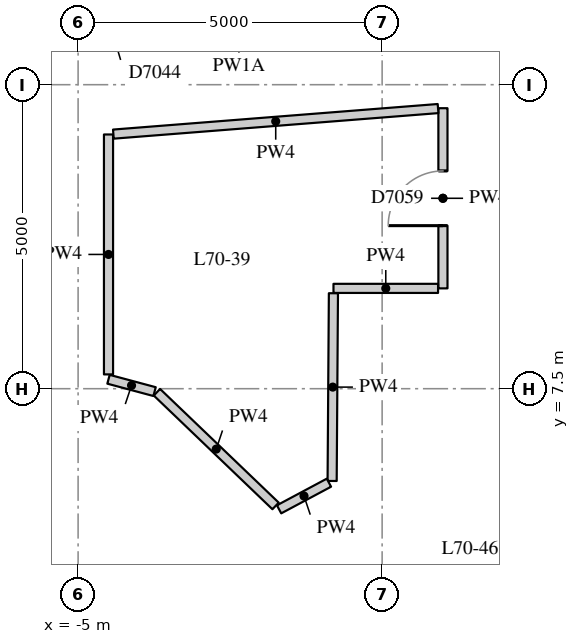
"""IFC4 building model, lengths in metres.
Left out: names, types, materials, properties, quantities, classifications, styles, units other than length and angle.
Written with IfcOpenShell. Run it as: python <this file> out.ifc"""

import sys

from ifc_helpers import new_model, si_unit, direction, frame, frame_2d, origin, place, context, subcontext, project, spatial, rectangle, extrude, element, fill, save


model = new_model("IFC4")
c1 = context("Model", 3, precision=1e-05, world=origin(), true_north=direction((0.0, 1.0)))
c2 = subcontext(c1, "Body", "Model", "MODEL_VIEW")
j1 = project(units=[si_unit("LENGTHUNIT", "METRE"), si_unit("PLANEANGLEUNIT", "RADIAN")], contexts=[c1])
p1 = place(None, origin())
s1 = spatial("IfcSite", under=j1, at=p1, CompositionType="ELEMENT")
p2 = place(p1, origin())
s2 = spatial("IfcBuilding", under=s1, at=p2, CompositionType="ELEMENT")
p3 = place(p2, frame((0.0, 0.0, 246.5)))
s3 = spatial("IfcBuildingStorey", under=s2, at=p3, CompositionType="ELEMENT", Elevation=246.5)
p4 = place(p3, frame((1.0, 12.113, 0.0), z_axis=(0.0, 0.0, 1.0), x_axis=(0.0, -1.0, 0.0)))
e1 = element("IfcWall", 1, at=p4, inside=s3, PredefinedType="PARTITIONING", context=c2, shape_type="SweptSolid", body=[
    extrude(rectangle(XDim=2.963, YDim=0.15, at=frame_2d((1.482, 0.0))), origin(), (0.0, 0.0, 1.0), 3.02),
])
p5 = place(p4, frame((1.032, 0.0, 0.0)))
e2 = element("IfcOpeningElement", 2, at=p5, cuts=e1, PredefinedType="OPENING", context=c2, shape_type="SweptSolid", body=[
    extrude(rectangle(XDim=0.9, YDim=2.1, at=frame_2d((0.45, 1.05))), frame((0.0, 0.085, 0.0), z_axis=(0.0, -1.0, 0.0), x_axis=(1.0, 0.0, 0.0)), (0.0, 0.0, 1.0), 0.17),
])
p6 = place(p3, frame((0.92, 9.15, 0.0), z_axis=(0.0, 0.0, 1.0), x_axis=(-1.0, 0.0, 0.0)))
e3 = element("IfcWall", 3, at=p6, inside=s3, PredefinedType="PARTITIONING", context=c2, shape_type="SweptSolid", body=[
    extrude(rectangle(XDim=1.72, YDim=0.15, at=frame_2d((0.86, 0.0))), origin(), (0.0, 0.0, 1.0), 3.02),
])
p7 = place(p3, frame((-0.801, 9.07, 0.0), z_axis=(0.0, 0.0, 1.0), x_axis=(-0.006879482938, -0.999976336077, 0.0)))
e4 = element("IfcWall", 4, at=p7, inside=s3, PredefinedType="PARTITIONING", context=c2, shape_type="SweptSolid", body=[
    extrude(rectangle(XDim=3.087, YDim=0.15, at=frame_2d((1.544, 0.0))), origin(), (0.0, 0.0, 1.0), 3.02),
])
p8 = place(p3, frame((-0.875, 5.954, 0.0), z_axis=(0.0, 0.0, 1.0), x_axis=(-0.882018256262, -0.471215232798, 0.0)))
e5 = element("IfcWall", 5, at=p8, inside=s3, PredefinedType="PARTITIONING", context=c2, shape_type="SweptSolid", body=[
    extrude(rectangle(XDim=0.929, YDim=0.15, at=frame_2d((0.465, 0.0))), origin(), (0.0, 0.0, 1.0), 3.02),
])
p9 = place(p3, frame((-1.752, 5.572, 0.0), z_axis=(0.0, 0.0, 1.0), x_axis=(-0.721943077846, 0.691952449487, 0.0)))
e6 = element("IfcWall", 6, at=p9, inside=s3, PredefinedType="PARTITIONING", context=c2, shape_type="SweptSolid", body=[
    extrude(rectangle(XDim=2.703, YDim=0.15, at=frame_2d((1.351, 0.0))), origin(), (0.0, 0.0, 1.0), 3.02),
])
p10 = place(p3, frame((-3.742, 7.452, 0.0), z_axis=(0.0, 0.0, 1.0), x_axis=(-0.965903596155, 0.258901994846, 0.0)))
e7 = element("IfcWall", 7, at=p10, inside=s3, PredefinedType="PARTITIONING", context=c2, shape_type="SweptSolid", body=[
    extrude(rectangle(XDim=0.785, YDim=0.15, at=frame_2d((0.392, 0.0))), origin(), (0.0, 0.0, 1.0), 3.02),
])
p11 = place(p3, frame((-4.5, 7.735, 0.0), z_axis=(0.0, 0.0, 1.0), x_axis=(0.0, 1.0, 0.0)))
e8 = element("IfcWall", 8, at=p11, inside=s3, PredefinedType="PARTITIONING", context=c2, shape_type="SweptSolid", body=[
    extrude(rectangle(XDim=3.946, YDim=0.15, at=frame_2d((1.973, 0.0))), origin(), (0.0, 0.0, 1.0), 3.02),
])
p12 = place(p3, frame((-4.42, 11.687, 0.0), z_axis=(0.0, 0.0, 1.0), x_axis=(0.996915064954, 0.078487917971, 0.0)))
e9 = element("IfcWall", 9, at=p12, inside=s3, PredefinedType="PARTITIONING", context=c2, shape_type="SweptSolid", body=[
    extrude(rectangle(XDim=5.356, YDim=0.15, at=frame_2d((2.678, 0.0))), origin(), (0.0, 0.0, 1.0), 3.02),
])
p13 = place(p3, frame((-8.0, 5.554, 0.0), z_axis=(0.0, 0.0, 1.0), x_axis=(0.923860025149, -0.382730523909, 0.0)))
e10 = element("IfcWall", 10, at=p13, inside=s3, PredefinedType="PARTITIONING", context=c2, shape_type="SweptSolid", body=[
    extrude(rectangle(XDim=4.251, YDim=0.1, at=frame_2d((2.125, 0.0))), origin(), (0.0, 0.0, 1.0), 3.02),
])
p14 = place(p5, origin())
e11 = element("IfcDoor", 11, at=p14, inside=s3, OperationType="SINGLE_SWING_LEFT", PredefinedType="DOOR", context=c2, shape_type="SweptSolid", body=[
    extrude(rectangle(XDim=0.9, YDim=2.1, at=frame_2d((0.45, 1.05))), frame((0.0, 0.025, 0.0), z_axis=(0.0, -1.0, 0.0), x_axis=(1.0, 0.0, 0.0)), (0.0, 0.0, 1.0), 0.05),
])
fill(e2, e11)
save(model, sys.argv[1])
